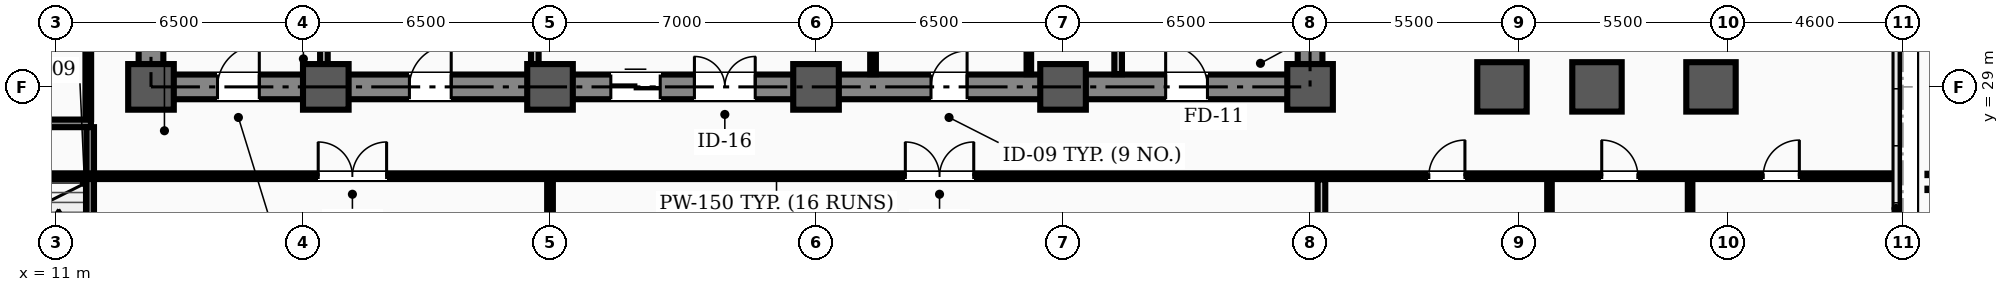
"""IFC4 building model, lengths in metres.
Left out: names, types, materials, properties, quantities, classifications, styles, units other than length and angle.
Written with IfcOpenShell. Run it as: python <this file> out.ifc"""

import sys

from ifc_helpers import new_model, si_unit, direction, frame, frame_2d, origin, origin_2d, place, context, subcontext, project, spatial, rectangle, hollow_rectangle, i_section, extrude, element, fill, save


model = new_model("IFC4")
c1 = context("Model", 3, precision=1e-05, world=origin(), true_north=direction((0.0, 1.0)))
c2 = subcontext(c1, "Body", "Model", "MODEL_VIEW")
j1 = project(units=[si_unit("LENGTHUNIT", "METRE"), si_unit("PLANEANGLEUNIT", "RADIAN")], contexts=[c1])
p1 = place(None, origin())
s1 = spatial("IfcSite", under=j1, at=p1, CompositionType="ELEMENT")
p2 = place(p1, origin())
s2 = spatial("IfcBuilding", under=s1, at=p2, CompositionType="ELEMENT")
p3 = place(p2, origin())
s3 = spatial("IfcBuildingStorey", under=s2, at=p3, CompositionType="ELEMENT", Elevation=0.0)
for number, where, z_axis, x_axis in (
    (1, (13.5, 29.0, 0.0), (0.0, 0.0, 1.0), (1.0, 0.0, 0.0)),
    (2, (18.1, 29.0, 0.0), (0.0, 0.0, 1.0), (1.0, 0.0, 0.0)),
    (3, (24.0, 29.0, 0.0), (0.0, 0.0, 1.0), (1.0, 0.0, 0.0)),
    (4, (31.0, 29.0, 0.0), (0.0, 0.0, 1.0), (1.0, 0.0, 0.0)),
    (5, (37.5, 29.0, 0.0), (0.0, 0.0, 1.0), (1.0, 0.0, 0.0)),
    (6, (44.0, 29.0, 0.0), (0.0, 0.0, 1.0), (1.0, 0.0, 0.0)),
):
    element("IfcColumn", number, at=place(p3, frame(where, z_axis=z_axis, x_axis=x_axis)), inside=s3, PredefinedType="COLUMN", context=c2, shape_type="SweptSolid", body=[
        extrude(hollow_rectangle(XDim=1.2, YDim=1.2, WallThickness=0.04, InnerFilletRadius=0.02, OuterFilletRadius=0.06, at=origin_2d()), origin(), (0.0, 0.0, 1.0), 5.8),
    ])
for number, where, z_axis, x_axis in (
    (7, (49.05, 29.0, 0.0), (0.0, 0.0, 1.0), (1.0, 0.0, 0.0)),
    (8, (51.55, 29.0, 0.0), (0.0, 0.0, 1.0), (1.0, 0.0, 0.0)),
    (9, (54.55, 29.0, 0.0), (0.0, 0.0, 1.0), (1.0, 0.0, 0.0)),
):
    element("IfcColumn", number, at=place(p3, frame(where, z_axis=z_axis, x_axis=x_axis)), inside=s3, PredefinedType="COLUMN", context=c2, shape_type="SweptSolid", body=[
        extrude(rectangle(XDim=1.3, YDim=1.3, at=origin_2d()), origin(), (0.0, 0.0, 1.0), 5.8),
    ])
p4 = place(p3, frame((60.45, 26.5, 0.0), z_axis=(0.0, 0.0, 1.0), x_axis=(1.0, 0.0, 0.0)))
e10 = element("IfcColumn", 10, at=p4, inside=s3, PredefinedType="COLUMN", context=c2, shape_type="SweptSolid", body=[
    extrude(i_section(OverallWidth=0.407, OverallDepth=0.428, WebThickness=0.02, FlangeThickness=0.035, FilletRadius=0.022, at=origin_2d()), origin(), (0.0, 0.0, 1.0), 5.8),
])
p5 = place(p3, frame((13.5, 29.0, 0.0), z_axis=(0.0, 0.0, 1.0), x_axis=(1.0, 0.0, 0.0)))
e11 = element("IfcWall", 11, at=p5, inside=s3, PredefinedType="SHEAR", context=c2, shape_type="SweptSolid", body=[
    extrude(rectangle(XDim=30.5, YDim=0.65, at=frame_2d((15.25, 0.0))), origin(), (0.0, 0.0, 1.0), 5.55),
])
p6 = place(p5, frame((1.75, 0.0, 0.0)))
e12 = element("IfcOpeningElement", 12, at=p6, cuts=e11, PredefinedType="OPENING", context=c2, shape_type="SweptSolid", body=[
    extrude(rectangle(XDim=1.1, YDim=2.08, at=frame_2d((0.55, 1.04))), frame((0.0, 0.335, 0.0), z_axis=(0.0, -1.0, 0.0), x_axis=(1.0, 0.0, 0.0)), (0.0, 0.0, 1.0), 0.67),
])
p7 = place(p5, frame((26.7, 0.0, 0.0)))
e13 = element("IfcOpeningElement", 13, at=p7, cuts=e11, PredefinedType="OPENING", context=c2, shape_type="SweptSolid", body=[
    extrude(rectangle(XDim=1.1, YDim=2.08, at=frame_2d((0.55, 1.04))), frame((0.0, 0.335, 0.0), z_axis=(0.0, -1.0, 0.0), x_axis=(1.0, 0.0, 0.0)), (0.0, 0.0, 1.0), 0.67),
])
p8 = place(p5, frame((6.8, 0.0, 0.0)))
e14 = element("IfcOpeningElement", 14, at=p8, cuts=e11, PredefinedType="OPENING", context=c2, shape_type="SweptSolid", body=[
    extrude(rectangle(XDim=1.1, YDim=2.08, at=frame_2d((0.55, 1.04))), frame((0.0, 0.335, 0.0), z_axis=(0.0, -1.0, 0.0), x_axis=(1.0, 0.0, 0.0)), (0.0, 0.0, 1.0), 0.67),
])
p9 = place(p5, frame((14.3, 0.0, 0.0)))
e15 = element("IfcOpeningElement", 15, at=p9, cuts=e11, PredefinedType="OPENING", context=c2, shape_type="SweptSolid", body=[
    extrude(rectangle(XDim=1.6, YDim=2.08, at=frame_2d((0.8, 1.04))), frame((0.0, 0.335, 0.0), z_axis=(0.0, -1.0, 0.0), x_axis=(1.0, 0.0, 0.0)), (0.0, 0.0, 1.0), 0.67),
])
p10 = place(p5, frame((20.525, 0.0, 0.0)))
e16 = element("IfcOpeningElement", 16, at=p10, cuts=e11, PredefinedType="OPENING", context=c2, shape_type="SweptSolid", body=[
    extrude(rectangle(XDim=0.95, YDim=2.08, at=frame_2d((0.475, 1.04))), frame((0.0, 0.335, 0.0), z_axis=(0.0, -1.0, 0.0), x_axis=(1.0, 0.0, 0.0)), (0.0, 0.0, 1.0), 0.67),
])
p11 = place(p5, frame((12.1, 0.0, 0.0)))
e17 = element("IfcOpeningElement", 17, at=p11, cuts=e11, PredefinedType="OPENING", context=c2, shape_type="SweptSolid", body=[
    extrude(rectangle(XDim=1.3, YDim=2.08, at=frame_2d((0.65, 1.04))), frame((0.0, 0.335, 0.0), z_axis=(0.0, -1.0, 0.0), x_axis=(1.0, 0.0, 0.0)), (0.0, 0.0, 1.0), 0.67),
])
for number, where, z_axis, x_axis in (
    (18, (13.5, 29.35, 0.0), (0.0, 0.0, 1.0), (0.0, 1.0, 0.0)),
    (19, (44.0, 29.35, 0.0), (0.0, 0.0, 1.0), (0.0, 1.0, 0.0)),
):
    element("IfcWall", number, at=place(p3, frame(where, z_axis=z_axis, x_axis=x_axis)), inside=s3, PredefinedType="SHEAR", context=c2, shape_type="SweptSolid", body=[
        extrude(rectangle(XDim=8.6, YDim=0.65, at=frame_2d((4.3, 0.0))), origin(), (0.0, 0.0, 1.0), 5.55),
    ])
p12 = place(p3, frame((8.56, 28.04, 0.0), z_axis=(0.0, 0.0, 1.0), x_axis=(1.0, 0.0, 0.0)))
e20 = element("IfcWall", 20, at=p12, inside=s3, PredefinedType="STANDARD", context=c2, shape_type="SweptSolid", body=[
    extrude(rectangle(XDim=3.36, YDim=0.2, at=frame_2d((1.68, 0.0))), origin(), (0.0, 0.0, 1.0), 5.55),
])
p13 = place(p3, frame((11.9, 21.1, 0.0), z_axis=(0.0, 0.0, 1.0), x_axis=(0.0, 1.0, 0.0)))
e21 = element("IfcWall", 21, at=p13, inside=s3, PredefinedType="STANDARD", context=c2, shape_type="SweptSolid", body=[
    extrude(rectangle(XDim=6.84, YDim=0.2, at=frame_2d((3.42, 0.0))), origin(), (0.0, 0.0, 1.0), 5.55),
])
p14 = place(p3, frame((0.57, 26.65, 0.0), z_axis=(0.0, 0.0, 1.0), x_axis=(1.0, 0.0, 0.0)))
e22 = element("IfcWall", 22, at=p14, inside=s3, PredefinedType="PARTITIONING", context=c2, shape_type="SweptSolid", body=[
    extrude(rectangle(XDim=58.78, YDim=0.15, at=frame_2d((29.39, 0.0))), origin(), (0.0, 0.0, 1.0), 4.83),
])
p15 = place(p14, frame((17.33, 0.0, 0.0)))
e23 = element("IfcOpeningElement", 23, at=p15, cuts=e22, PredefinedType="OPENING", context=c2, shape_type="SweptSolid", body=[
    extrude(rectangle(XDim=1.8, YDim=2.08, at=frame_2d((0.9, 1.04))), frame((0.0, 0.085, 0.0), z_axis=(0.0, -1.0, 0.0), x_axis=(1.0, 0.0, 0.0)), (0.0, 0.0, 1.0), 0.17),
])
p16 = place(p14, frame((32.78, 0.0, 0.0)))
e24 = element("IfcOpeningElement", 24, at=p16, cuts=e22, PredefinedType="OPENING", context=c2, shape_type="SweptSolid", body=[
    extrude(rectangle(XDim=1.8, YDim=2.08, at=frame_2d((0.9, 1.04))), frame((0.0, 0.085, 0.0), z_axis=(0.0, -1.0, 0.0), x_axis=(1.0, 0.0, 0.0)), (0.0, 0.0, 1.0), 0.17),
])
p17 = place(p14, frame((46.555, 0.0, 0.0)))
e25 = element("IfcOpeningElement", 25, at=p17, cuts=e22, PredefinedType="OPENING", context=c2, shape_type="SweptSolid", body=[
    extrude(rectangle(XDim=0.95, YDim=2.08, at=frame_2d((0.475, 1.04))), frame((0.0, 0.085, 0.0), z_axis=(0.0, -1.0, 0.0), x_axis=(1.0, 0.0, 0.0)), (0.0, 0.0, 1.0), 0.17),
])
p18 = place(p14, frame((51.105, 0.0, 0.0)))
e26 = element("IfcOpeningElement", 26, at=p18, cuts=e22, PredefinedType="OPENING", context=c2, shape_type="SweptSolid", body=[
    extrude(rectangle(XDim=0.95, YDim=2.08, at=frame_2d((0.475, 1.04))), frame((0.0, 0.085, 0.0), z_axis=(0.0, -1.0, 0.0), x_axis=(1.0, 0.0, 0.0)), (0.0, 0.0, 1.0), 0.17),
])
p19 = place(p14, frame((55.355, 0.0, 0.0)))
e27 = element("IfcOpeningElement", 27, at=p19, cuts=e22, PredefinedType="OPENING", context=c2, shape_type="SweptSolid", body=[
    extrude(rectangle(XDim=0.95, YDim=2.08, at=frame_2d((0.475, 1.04))), frame((0.0, 0.085, 0.0), z_axis=(0.0, -1.0, 0.0), x_axis=(1.0, 0.0, 0.0)), (0.0, 0.0, 1.0), 0.17),
])
p20 = place(p3, frame((24.0, 0.57, 0.0), z_axis=(0.0, 0.0, 1.0), x_axis=(0.0, 1.0, 0.0)))
e28 = element("IfcWall", 28, at=p20, inside=s3, PredefinedType="PARTITIONING", context=c2, shape_type="SweptSolid", body=[
    extrude(rectangle(XDim=25.995, YDim=0.15, at=frame_2d((12.998, 0.0))), origin(), (0.0, 0.0, 1.0), 4.73),
])
p21 = place(p20, frame((16.03, 0.0, 0.0)))
e29 = element("IfcOpeningElement", 29, at=p21, cuts=e28, PredefinedType="OPENING", context=c2, shape_type="SweptSolid", body=[
    extrude(rectangle(XDim=1.8, YDim=2.08, at=frame_2d((0.9, 1.04))), frame((0.0, 0.085, 0.0), z_axis=(0.0, -1.0, 0.0), x_axis=(1.0, 0.0, 0.0)), (0.0, 0.0, 1.0), 0.17),
])
p22 = place(p3, frame((44.3, 0.57, 0.0), z_axis=(0.0, 0.0, 1.0), x_axis=(0.0, 1.0, 0.0)))
e30 = element("IfcWall", 30, at=p22, inside=s3, PredefinedType="STANDARD", context=c2, shape_type="SweptSolid", body=[
    extrude(rectangle(XDim=25.995, YDim=0.2, at=frame_2d((12.998, 0.0))), origin(), (0.0, 0.0, 1.0), 3.9),
])
p23 = place(p22, frame((6.48, 0.0, 0.0)))
e31 = element("IfcOpeningElement", 31, at=p23, cuts=e30, PredefinedType="OPENING", context=c2, shape_type="SweptSolid", body=[
    extrude(rectangle(XDim=1.1, YDim=2.08, at=frame_2d((0.55, 1.04))), frame((0.0, 0.11, 0.0), z_axis=(0.0, -1.0, 0.0), x_axis=(1.0, 0.0, 0.0)), (0.0, 0.0, 1.0), 0.22),
])
p24 = place(p22, frame((16.555, 0.0, 0.0)))
e32 = element("IfcOpeningElement", 32, at=p24, cuts=e30, PredefinedType="OPENING", context=c2, shape_type="SweptSolid", body=[
    extrude(rectangle(XDim=0.95, YDim=2.08, at=frame_2d((0.475, 1.04))), frame((0.0, 0.11, 0.0), z_axis=(0.0, -1.0, 0.0), x_axis=(1.0, 0.0, 0.0)), (0.0, 0.0, 1.0), 0.22),
])
for number, where, z_axis, x_axis in (
    (33, (50.3, 19.885, 0.0), (0.0, 0.0, 1.0), (0.0, 1.0, 0.0)),
    (34, (54.0, 19.885, 0.0), (0.0, 0.0, 1.0), (0.0, 1.0, 0.0)),
):
    element("IfcWall", number, at=place(p3, frame(where, z_axis=z_axis, x_axis=x_axis)), inside=s3, PredefinedType="PARTITIONING", context=c2, shape_type="SweptSolid", body=[
        extrude(rectangle(XDim=6.68, YDim=0.12, at=frame_2d((3.34, 0.0))), origin(), (0.0, 0.0, 1.0), 4.73),
    ])
p25 = place(p3, frame((11.85, 28.15, 0.0), z_axis=(0.0, 0.0, 1.0), x_axis=(0.0, 1.0, 0.0)))
e35 = element("IfcWall", 35, at=p25, inside=s3, PredefinedType="PARTITIONING", context=c2, shape_type="SweptSolid", body=[
    extrude(rectangle(XDim=8.49, YDim=0.15, at=frame_2d((4.245, 0.0))), origin(), (0.0, 0.0, 1.0), 4.73),
])
for number, where, z_axis, x_axis in (
    (36, (18.05, 29.335, 0.0), (0.0, 0.0, 1.0), (0.0, 1.0, 0.0)),
    (37, (38.95, 29.335, 0.0), (0.0, 0.0, 1.0), (0.0, 1.0, 0.0)),
):
    element("IfcWall", number, at=place(p3, frame(where, z_axis=z_axis, x_axis=x_axis)), inside=s3, PredefinedType="STANDARD", context=c2, shape_type="SweptSolid", body=[
        extrude(rectangle(XDim=0.965, YDim=0.2, at=frame_2d((0.482, 0.0))), origin(), (0.0, 0.0, 1.0), 4.73),
    ])
p26 = place(p3, frame((23.6, 29.335, 0.0), z_axis=(0.0, 0.0, 1.0), x_axis=(0.0, 1.0, 0.0)))
e38 = element("IfcWall", 38, at=p26, inside=s3, PredefinedType="STANDARD", context=c2, shape_type="SweptSolid", body=[
    extrude(rectangle(XDim=5.365, YDim=0.2, at=frame_2d((2.683, 0.0))), origin(), (0.0, 0.0, 1.0), 4.73),
])
p27 = place(p3, frame((32.5, 29.335, 0.0), z_axis=(0.0, 0.0, 1.0), x_axis=(0.0, 1.0, 0.0)))
e39 = element("IfcWall", 39, at=p27, inside=s3, PredefinedType="PARTITIONING", context=c2, shape_type="SweptSolid", body=[
    extrude(rectangle(XDim=2.43, YDim=0.15, at=frame_2d((1.215, 0.0))), origin(), (0.0, 0.0, 1.0), 4.73),
])
p28 = place(p3, frame((36.6, 29.335, 0.0), z_axis=(0.0, 0.0, 1.0), x_axis=(0.0, 1.0, 0.0)))
e40 = element("IfcWall", 40, at=p28, inside=s3, PredefinedType="PARTITIONING", context=c2, shape_type="SweptSolid", body=[
    extrude(rectangle(XDim=2.43, YDim=0.12, at=frame_2d((1.215, 0.0))), origin(), (0.0, 0.0, 1.0), 4.73),
])
p29 = place(p15, origin())
e41 = element("IfcDoor", 41, at=p29, inside=s3, OperationType="DOUBLE_DOOR_SINGLE_SWING", PredefinedType="DOOR", context=c2, shape_type="SweptSolid", body=[
    extrude(rectangle(XDim=1.8, YDim=2.08, at=frame_2d((0.9, 1.04))), frame((0.0, 0.025, 0.0), z_axis=(0.0, -1.0, 0.0), x_axis=(1.0, 0.0, 0.0)), (0.0, 0.0, 1.0), 0.05),
])
fill(e23, e41)
p30 = place(p16, origin())
e42 = element("IfcDoor", 42, at=p30, inside=s3, OperationType="DOUBLE_DOOR_SINGLE_SWING", PredefinedType="DOOR", context=c2, shape_type="SweptSolid", body=[
    extrude(rectangle(XDim=1.8, YDim=2.08, at=frame_2d((0.9, 1.04))), frame((0.0, 0.025, 0.0), z_axis=(0.0, -1.0, 0.0), x_axis=(1.0, 0.0, 0.0)), (0.0, 0.0, 1.0), 0.05),
])
fill(e24, e42)
p31 = place(p17, origin())
e43 = element("IfcDoor", 43, at=p31, inside=s3, OperationType="SINGLE_SWING_RIGHT", PredefinedType="DOOR", context=c2, shape_type="SweptSolid", body=[
    extrude(rectangle(XDim=0.95, YDim=2.08, at=frame_2d((0.475, 1.04))), frame((0.0, 0.025, 0.0), z_axis=(0.0, -1.0, 0.0), x_axis=(1.0, 0.0, 0.0)), (0.0, 0.0, 1.0), 0.05),
])
fill(e25, e43)
p32 = place(p18, origin())
e44 = element("IfcDoor", 44, at=p32, inside=s3, OperationType="SINGLE_SWING_LEFT", PredefinedType="DOOR", context=c2, shape_type="SweptSolid", body=[
    extrude(rectangle(XDim=0.95, YDim=2.08, at=frame_2d((0.475, 1.04))), frame((0.0, 0.025, 0.0), z_axis=(0.0, -1.0, 0.0), x_axis=(1.0, 0.0, 0.0)), (0.0, 0.0, 1.0), 0.05),
])
fill(e26, e44)
p33 = place(p19, origin())
e45 = element("IfcDoor", 45, at=p33, inside=s3, OperationType="SINGLE_SWING_RIGHT", PredefinedType="DOOR", context=c2, shape_type="SweptSolid", body=[
    extrude(rectangle(XDim=0.95, YDim=2.08, at=frame_2d((0.475, 1.04))), frame((0.0, 0.025, 0.0), z_axis=(0.0, -1.0, 0.0), x_axis=(1.0, 0.0, 0.0)), (0.0, 0.0, 1.0), 0.05),
])
fill(e27, e45)
p34 = place(p6, origin())
e46 = element("IfcDoor", 46, at=p34, inside=s3, OperationType="SINGLE_SWING_RIGHT", PredefinedType="DOOR", context=c2, shape_type="SweptSolid", body=[
    extrude(rectangle(XDim=1.1, YDim=2.08, at=frame_2d((0.55, 1.04))), frame((0.0, 0.025, 0.0), z_axis=(0.0, -1.0, 0.0), x_axis=(1.0, 0.0, 0.0)), (0.0, 0.0, 1.0), 0.05),
])
fill(e12, e46)
p35 = place(p7, origin())
e47 = element("IfcDoor", 47, at=p35, inside=s3, OperationType="SINGLE_SWING_LEFT", PredefinedType="DOOR", context=c2, shape_type="SweptSolid", body=[
    extrude(rectangle(XDim=1.1, YDim=2.08, at=frame_2d((0.55, 1.04))), frame((0.0, 0.025, 0.0), z_axis=(0.0, -1.0, 0.0), x_axis=(1.0, 0.0, 0.0)), (0.0, 0.0, 1.0), 0.05),
])
fill(e13, e47)
p36 = place(p8, origin())
e48 = element("IfcDoor", 48, at=p36, inside=s3, OperationType="SINGLE_SWING_RIGHT", PredefinedType="DOOR", context=c2, shape_type="SweptSolid", body=[
    extrude(rectangle(XDim=1.1, YDim=2.08, at=frame_2d((0.55, 1.04))), frame((0.0, 0.025, 0.0), z_axis=(0.0, -1.0, 0.0), x_axis=(1.0, 0.0, 0.0)), (0.0, 0.0, 1.0), 0.05),
])
fill(e14, e48)
p37 = place(p9, origin())
e49 = element("IfcDoor", 49, at=p37, inside=s3, OperationType="DOUBLE_DOOR_SINGLE_SWING", PredefinedType="DOOR", context=c2, shape_type="SweptSolid", body=[
    extrude(rectangle(XDim=1.6, YDim=2.08, at=frame_2d((0.8, 1.04))), frame((0.0, 0.025, 0.0), z_axis=(0.0, -1.0, 0.0), x_axis=(1.0, 0.0, 0.0)), (0.0, 0.0, 1.0), 0.05),
])
fill(e15, e49)
p38 = place(p10, origin())
e50 = element("IfcDoor", 50, at=p38, inside=s3, OperationType="SINGLE_SWING_RIGHT", PredefinedType="DOOR", context=c2, shape_type="SweptSolid", body=[
    extrude(rectangle(XDim=0.95, YDim=2.08, at=frame_2d((0.475, 1.04))), frame((0.0, 0.025, 0.0), z_axis=(0.0, -1.0, 0.0), x_axis=(1.0, 0.0, 0.0)), (0.0, 0.0, 1.0), 0.05),
])
fill(e16, e50)
p39 = place(p11, origin())
e51 = element("IfcDoor", 51, at=p39, inside=s3, OperationType="DOUBLE_DOOR_SLIDING", PredefinedType="DOOR", context=c2, shape_type="SweptSolid", body=[
    extrude(rectangle(XDim=1.3, YDim=2.08, at=frame_2d((0.65, 1.04))), frame((0.0, 0.025, 0.0), z_axis=(0.0, -1.0, 0.0), x_axis=(1.0, 0.0, 0.0)), (0.0, 0.0, 1.0), 0.05),
])
fill(e17, e51)
save(model, sys.argv[1])
